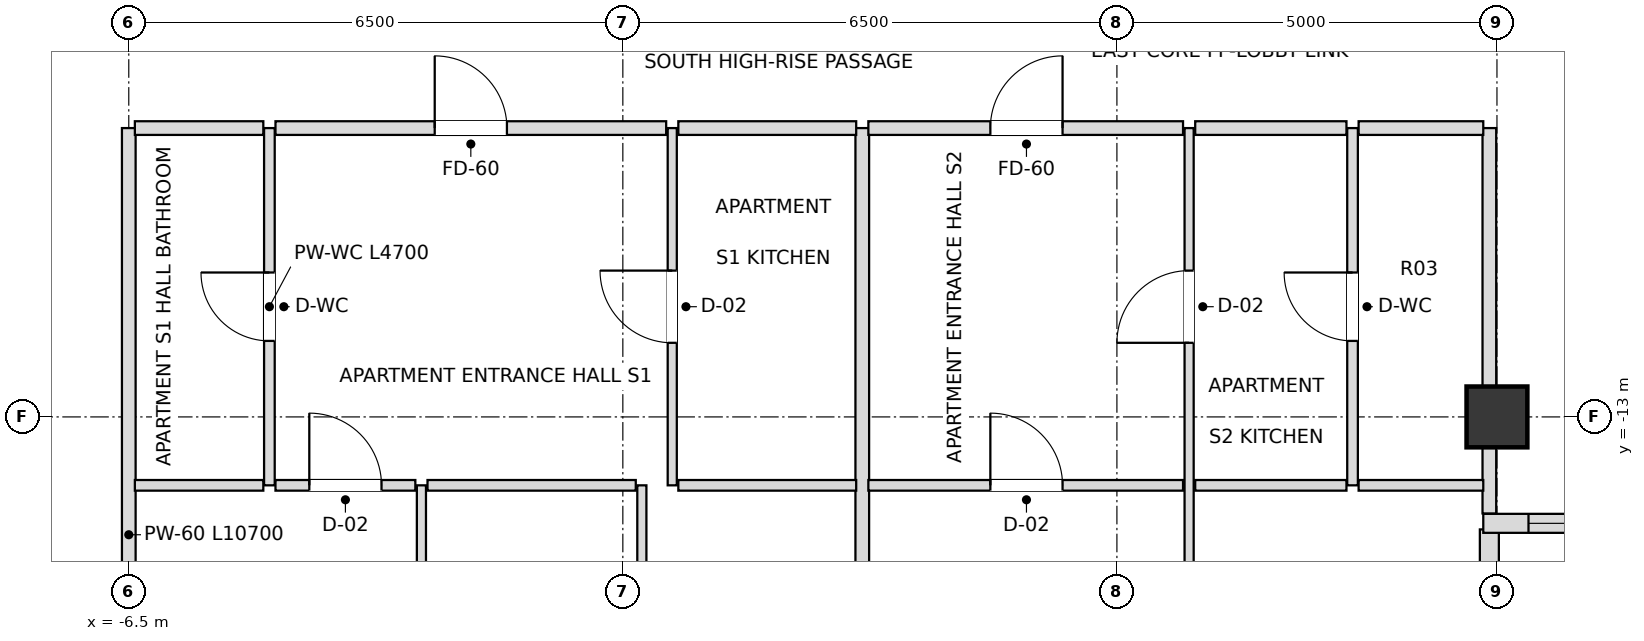
"""IFC4 building model, lengths in metres.
Left out: names, types, materials, properties, quantities, classifications, styles, units other than length and angle.
Written with IfcOpenShell. Run it as: python <this file> out.ifc"""

import sys

from ifc_helpers import new_model, si_unit, direction, frame, frame_2d, origin, origin_2d, place, context, subcontext, project, spatial, rectangle, extrude, element, fill, save


model = new_model("IFC4")
c1 = context("Model", 3, precision=1e-05, world=origin(), true_north=direction((0.0, 1.0)))
c2 = subcontext(c1, "Body", "Model", "MODEL_VIEW")
j1 = project(units=[si_unit("LENGTHUNIT", "METRE"), si_unit("PLANEANGLEUNIT", "RADIAN")], contexts=[c1])
p1 = place(None, origin())
s1 = spatial("IfcSite", under=j1, at=p1, CompositionType="ELEMENT")
p2 = place(p1, origin())
s2 = spatial("IfcBuilding", under=s1, at=p2, CompositionType="ELEMENT")
p3 = place(p2, frame((0.0, 0.0, 236.7)))
s3 = spatial("IfcBuildingStorey", under=s2, at=p3, CompositionType="ELEMENT", Elevation=236.7)
p4 = place(p3, frame((11.5, -13.0, 0.0), z_axis=(0.0, 0.0, 1.0), x_axis=(1.0, 0.0, 0.0)))
e1 = element("IfcColumn", 1, at=p4, inside=s3, PredefinedType="COLUMN", context=c2, shape_type="SweptSolid", body=[
    extrude(rectangle(XDim=0.8, YDim=0.8, at=origin_2d()), origin(), (0.0, 0.0, 1.0), 3.6),
])
p5 = place(p3, frame((11.4, -19.82, 0.0), z_axis=(0.0, 0.0, 1.0), x_axis=(0.0, 1.0, 0.0)))
e2 = element("IfcWall", 2, at=p5, inside=s3, PredefinedType="SOLIDWALL", context=c2, shape_type="SweptSolid", body=[
    extrude(rectangle(XDim=5.34, YDim=0.25, at=frame_2d((2.67, 0.0))), origin(), (0.0, 0.0, 1.0), 2.748),
])
p6 = place(p5, frame((1.925, 0.0, 0.72)))
e3 = element("IfcOpeningElement", 3, at=p6, cuts=e2, PredefinedType="OPENING", context=c2, shape_type="SweptSolid", body=[
    extrude(rectangle(XDim=1.8, YDim=1.68, at=frame_2d((0.9, 0.84))), frame((0.0, 0.135, 0.0), z_axis=(0.0, -1.0, 0.0), x_axis=(1.0, 0.0, 0.0)), (0.0, 0.0, 1.0), 0.27),
])
p7 = place(p3, frame((11.32, -14.4, 0.0), z_axis=(0.0, 0.0, 1.0), x_axis=(1.0, 0.0, 0.0)))
e4 = element("IfcWall", 4, at=p7, inside=s3, PredefinedType="SOLIDWALL", context=c2, shape_type="SweptSolid", body=[
    extrude(rectangle(XDim=5.66, YDim=0.25, at=frame_2d((2.83, 0.0))), origin(), (0.0, 0.0, 1.0), 2.748),
])
p8 = place(p7, frame((0.595, 0.0, 0.72)))
e5 = element("IfcOpeningElement", 5, at=p8, cuts=e4, PredefinedType="OPENING", context=c2, shape_type="SweptSolid", body=[
    extrude(rectangle(XDim=1.8, YDim=1.68, at=frame_2d((0.9, 0.84))), frame((0.0, 0.135, 0.0), z_axis=(0.0, -1.0, 0.0), x_axis=(1.0, 0.0, 0.0)), (0.0, 0.0, 1.0), 0.27),
])
p9 = place(p7, frame((3.265, 0.0, 0.72)))
e6 = element("IfcOpeningElement", 6, at=p9, cuts=e4, PredefinedType="OPENING", context=c2, shape_type="SweptSolid", body=[
    extrude(rectangle(XDim=1.8, YDim=1.68, at=frame_2d((0.9, 0.84))), frame((0.0, 0.135, 0.0), z_axis=(0.0, -1.0, 0.0), x_axis=(1.0, 0.0, 0.0)), (0.0, 0.0, 1.0), 0.27),
])
p10 = place(p3, frame((-6.5, -19.9, 0.0), z_axis=(0.0, 0.0, 1.0), x_axis=(0.0, 1.0, 0.0)))
e7 = element("IfcWall", 7, at=p10, inside=s3, PredefinedType="PARTITIONING", context=c2, shape_type="SweptSolid", body=[
    extrude(rectangle(XDim=10.7, YDim=0.18, at=frame_2d((5.35, 0.0))), origin(), (0.0, 0.0, 1.0), 2.826),
])
p11 = place(p3, frame((-4.65, -13.9, 0.0), z_axis=(0.0, 0.0, 1.0), x_axis=(0.0, 1.0, 0.0)))
e8 = element("IfcWall", 8, at=p11, inside=s3, PredefinedType="PARTITIONING", context=c2, shape_type="SweptSolid", body=[
    extrude(rectangle(XDim=4.7, YDim=0.14, at=frame_2d((2.35, 0.0))), origin(), (0.0, 0.0, 1.0), 3.38),
])
p12 = place(p11, frame((1.9, 0.0, 0.0)))
e9 = element("IfcOpeningElement", 9, at=p12, cuts=e8, PredefinedType="OPENING", context=c2, shape_type="SweptSolid", body=[
    extrude(rectangle(XDim=0.9, YDim=2.1, at=frame_2d((0.45, 1.05))), frame((0.0, 0.08, 0.0), z_axis=(0.0, -1.0, 0.0), x_axis=(1.0, 0.0, 0.0)), (0.0, 0.0, 1.0), 0.16),
])
p13 = place(p3, frame((-2.65, -19.9, 0.0), z_axis=(0.0, 0.0, 1.0), x_axis=(0.0, 1.0, 0.0)))
e10 = element("IfcWall", 10, at=p13, inside=s3, PredefinedType="PARTITIONING", context=c2, shape_type="SweptSolid", body=[
    extrude(rectangle(XDim=6.0, YDim=0.12, at=frame_2d((3.0, 0.0))), origin(), (0.0, 0.0, 1.0), 3.018),
])
p14 = place(p13, frame((2.55, 0.0, 0.0)))
e11 = element("IfcOpeningElement", 11, at=p14, cuts=e10, PredefinedType="OPENING", context=c2, shape_type="SweptSolid", body=[
    extrude(rectangle(XDim=0.9, YDim=2.1, at=frame_2d((0.45, 1.05))), frame((0.0, 0.07, 0.0), z_axis=(0.0, -1.0, 0.0), x_axis=(1.0, 0.0, 0.0)), (0.0, 0.0, 1.0), 0.14),
])
p15 = place(p3, frame((0.25, -19.9, 0.0), z_axis=(0.0, 0.0, 1.0), x_axis=(0.0, 1.0, 0.0)))
e12 = element("IfcWall", 12, at=p15, inside=s3, PredefinedType="PARTITIONING", context=c2, shape_type="SweptSolid", body=[
    extrude(rectangle(XDim=6.0, YDim=0.12, at=frame_2d((3.0, 0.0))), origin(), (0.0, 0.0, 1.0), 3.018),
])
p16 = place(p15, frame((2.55, 0.0, 0.0)))
e13 = element("IfcOpeningElement", 13, at=p16, cuts=e12, PredefinedType="OPENING", context=c2, shape_type="SweptSolid", body=[
    extrude(rectangle(XDim=0.9, YDim=2.1, at=frame_2d((0.45, 1.05))), frame((0.0, 0.07, 0.0), z_axis=(0.0, -1.0, 0.0), x_axis=(1.0, 0.0, 0.0)), (0.0, 0.0, 1.0), 0.14),
])
p17 = place(p3, frame((0.65, -13.9, 0.0), z_axis=(0.0, 0.0, 1.0), x_axis=(0.0, 1.0, 0.0)))
e14 = element("IfcWall", 14, at=p17, inside=s3, PredefinedType="PARTITIONING", context=c2, shape_type="SweptSolid", body=[
    extrude(rectangle(XDim=4.7, YDim=0.12, at=frame_2d((2.35, 0.0))), origin(), (0.0, 0.0, 1.0), 3.38),
])
p18 = place(p17, frame((1.875, 0.0, 0.0)))
e15 = element("IfcOpeningElement", 15, at=p18, cuts=e14, PredefinedType="OPENING", context=c2, shape_type="SweptSolid", body=[
    extrude(rectangle(XDim=0.95, YDim=2.1, at=frame_2d((0.475, 1.05))), frame((0.0, 0.07, 0.0), z_axis=(0.0, -1.0, 0.0), x_axis=(1.0, 0.0, 0.0)), (0.0, 0.0, 1.0), 0.14),
])
p19 = place(p3, frame((3.15, -19.9, 0.0), z_axis=(0.0, 0.0, 1.0), x_axis=(0.0, 1.0, 0.0)))
e16 = element("IfcWall", 16, at=p19, inside=s3, PredefinedType="PARTITIONING", context=c2, shape_type="SweptSolid", body=[
    extrude(rectangle(XDim=10.7, YDim=0.18, at=frame_2d((5.35, 0.0))), origin(), (0.0, 0.0, 1.0), 3.018),
])
p20 = place(p3, frame((7.45, -19.9, 0.0), z_axis=(0.0, 0.0, 1.0), x_axis=(0.0, 1.0, 0.0)))
e17 = element("IfcWall", 17, at=p20, inside=s3, PredefinedType="PARTITIONING", context=c2, shape_type="SweptSolid", body=[
    extrude(rectangle(XDim=10.7, YDim=0.12, at=frame_2d((5.35, 0.0))), origin(), (0.0, 0.0, 1.0), 2.826),
])
p21 = place(p20, frame((7.875, 0.0, 0.0)))
e18 = element("IfcOpeningElement", 18, at=p21, cuts=e17, PredefinedType="OPENING", context=c2, shape_type="SweptSolid", body=[
    extrude(rectangle(XDim=0.95, YDim=2.1, at=frame_2d((0.475, 1.05))), frame((0.0, 0.07, 0.0), z_axis=(0.0, -1.0, 0.0), x_axis=(1.0, 0.0, 0.0)), (0.0, 0.0, 1.0), 0.14),
])
p22 = place(p20, frame((2.55, 0.0, 0.0)))
e19 = element("IfcOpeningElement", 19, at=p22, cuts=e17, PredefinedType="OPENING", context=c2, shape_type="SweptSolid", body=[
    extrude(rectangle(XDim=0.9, YDim=2.1, at=frame_2d((0.45, 1.05))), frame((0.0, 0.07, 0.0), z_axis=(0.0, -1.0, 0.0), x_axis=(1.0, 0.0, 0.0)), (0.0, 0.0, 1.0), 0.14),
])
p23 = place(p3, frame((9.6, -13.9, 0.0), z_axis=(0.0, 0.0, 1.0), x_axis=(0.0, 1.0, 0.0)))
e20 = element("IfcWall", 20, at=p23, inside=s3, PredefinedType="PARTITIONING", context=c2, shape_type="SweptSolid", body=[
    extrude(rectangle(XDim=4.7, YDim=0.14, at=frame_2d((2.35, 0.0))), origin(), (0.0, 0.0, 1.0), 2.826),
])
p24 = place(p23, frame((1.9, 0.0, 0.0)))
e21 = element("IfcOpeningElement", 21, at=p24, cuts=e20, PredefinedType="OPENING", context=c2, shape_type="SweptSolid", body=[
    extrude(rectangle(XDim=0.9, YDim=2.1, at=frame_2d((0.45, 1.05))), frame((0.0, 0.08, 0.0), z_axis=(0.0, -1.0, 0.0), x_axis=(1.0, 0.0, 0.0)), (0.0, 0.0, 1.0), 0.16),
])
p25 = place(p3, frame((11.4, -14.27, 0.0), z_axis=(0.0, 0.0, 1.0), x_axis=(0.0, 1.0, 0.0)))
e22 = element("IfcWall", 22, at=p25, inside=s3, PredefinedType="PARTITIONING", context=c2, shape_type="SweptSolid", body=[
    extrude(rectangle(XDim=5.07, YDim=0.18, at=frame_2d((2.535, 0.0))), origin(), (0.0, 0.0, 1.0), 2.748),
])
p26 = place(p3, frame((-6.42, -13.9, 0.0), z_axis=(0.0, 0.0, 1.0), x_axis=(1.0, 0.0, 0.0)))
e23 = element("IfcWall", 23, at=p26, inside=s3, PredefinedType="PARTITIONING", context=c2, shape_type="SweptSolid", body=[
    extrude(rectangle(XDim=1.69, YDim=0.14, at=frame_2d((0.845, 0.0))), origin(), (0.0, 0.0, 1.0), 3.38),
])
p27 = place(p3, frame((-4.57, -13.9, 0.0), z_axis=(0.0, 0.0, 1.0), x_axis=(1.0, 0.0, 0.0)))
e24 = element("IfcWall", 24, at=p27, inside=s3, PredefinedType="PARTITIONING", context=c2, shape_type="SweptSolid", body=[
    extrude(rectangle(XDim=1.84, YDim=0.14, at=frame_2d((0.92, 0.0))), origin(), (0.0, 0.0, 1.0), 3.38),
])
p28 = place(p27, frame((0.445, 0.0, 0.0)))
e25 = element("IfcOpeningElement", 25, at=p28, cuts=e24, PredefinedType="OPENING", context=c2, shape_type="SweptSolid", body=[
    extrude(rectangle(XDim=0.95, YDim=2.1, at=frame_2d((0.475, 1.05))), frame((0.0, 0.08, 0.0), z_axis=(0.0, -1.0, 0.0), x_axis=(1.0, 0.0, 0.0)), (0.0, 0.0, 1.0), 0.16),
])
p29 = place(p3, frame((-2.57, -13.9, 0.0), z_axis=(0.0, 0.0, 1.0), x_axis=(1.0, 0.0, 0.0)))
e26 = element("IfcWall", 26, at=p29, inside=s3, PredefinedType="PARTITIONING", context=c2, shape_type="SweptSolid", body=[
    extrude(rectangle(XDim=2.74, YDim=0.14, at=frame_2d((1.37, 0.0))), origin(), (0.0, 0.0, 1.0), 3.38),
])
p30 = place(p3, frame((0.73, -13.9, 0.0), z_axis=(0.0, 0.0, 1.0), x_axis=(1.0, 0.0, 0.0)))
e27 = element("IfcWall", 27, at=p30, inside=s3, PredefinedType="PARTITIONING", context=c2, shape_type="SweptSolid", body=[
    extrude(rectangle(XDim=2.34, YDim=0.14, at=frame_2d((1.17, 0.0))), origin(), (0.0, 0.0, 1.0), 3.38),
])
p31 = place(p3, frame((3.23, -13.9, 0.0), z_axis=(0.0, 0.0, 1.0), x_axis=(1.0, 0.0, 0.0)))
e28 = element("IfcWall", 28, at=p31, inside=s3, PredefinedType="PARTITIONING", context=c2, shape_type="SweptSolid", body=[
    extrude(rectangle(XDim=4.14, YDim=0.14, at=frame_2d((2.07, 0.0))), origin(), (0.0, 0.0, 1.0), 2.826),
])
p32 = place(p31, frame((1.605, 0.0, 0.0)))
e29 = element("IfcOpeningElement", 29, at=p32, cuts=e28, PredefinedType="OPENING", context=c2, shape_type="SweptSolid", body=[
    extrude(rectangle(XDim=0.95, YDim=2.1, at=frame_2d((0.475, 1.05))), frame((0.0, 0.08, 0.0), z_axis=(0.0, -1.0, 0.0), x_axis=(1.0, 0.0, 0.0)), (0.0, 0.0, 1.0), 0.16),
])
p33 = place(p3, frame((7.53, -13.9, 0.0), z_axis=(0.0, 0.0, 1.0), x_axis=(1.0, 0.0, 0.0)))
e30 = element("IfcWall", 30, at=p33, inside=s3, PredefinedType="PARTITIONING", context=c2, shape_type="SweptSolid", body=[
    extrude(rectangle(XDim=1.99, YDim=0.14, at=frame_2d((0.995, 0.0))), origin(), (0.0, 0.0, 1.0), 3.38),
])
p34 = place(p3, frame((9.68, -13.9, 0.0), z_axis=(0.0, 0.0, 1.0), x_axis=(1.0, 0.0, 0.0)))
e31 = element("IfcWall", 31, at=p34, inside=s3, PredefinedType="PARTITIONING", context=c2, shape_type="SweptSolid", body=[
    extrude(rectangle(XDim=1.64, YDim=0.14, at=frame_2d((0.82, 0.0))), origin(), (0.0, 0.0, 1.0), 3.38),
])
p35 = place(p3, frame((-6.42, -9.2, 0.0), z_axis=(0.0, 0.0, 1.0), x_axis=(1.0, 0.0, 0.0)))
e32 = element("IfcWall", 32, at=p35, inside=s3, PredefinedType="PARTITIONING", context=c2, shape_type="SweptSolid", body=[
    extrude(rectangle(XDim=1.69, YDim=0.18, at=frame_2d((0.845, 0.0))), origin(), (0.0, 0.0, 1.0), 3.38),
])
p36 = place(p3, frame((-4.57, -9.2, 0.0), z_axis=(0.0, 0.0, 1.0), x_axis=(1.0, 0.0, 0.0)))
e33 = element("IfcWall", 33, at=p36, inside=s3, PredefinedType="PARTITIONING", context=c2, shape_type="SweptSolid", body=[
    extrude(rectangle(XDim=5.14, YDim=0.18, at=frame_2d((2.57, 0.0))), origin(), (0.0, 0.0, 1.0), 3.38),
])
p37 = place(p36, frame((2.095, 0.0, 0.0)))
e34 = element("IfcOpeningElement", 34, at=p37, cuts=e33, PredefinedType="OPENING", context=c2, shape_type="SweptSolid", body=[
    extrude(rectangle(XDim=0.95, YDim=2.15, at=frame_2d((0.475, 1.075))), frame((0.0, 0.1, 0.0), z_axis=(0.0, -1.0, 0.0), x_axis=(1.0, 0.0, 0.0)), (0.0, 0.0, 1.0), 0.2),
])
p38 = place(p3, frame((0.73, -9.2, 0.0), z_axis=(0.0, 0.0, 1.0), x_axis=(1.0, 0.0, 0.0)))
e35 = element("IfcWall", 35, at=p38, inside=s3, PredefinedType="PARTITIONING", context=c2, shape_type="SweptSolid", body=[
    extrude(rectangle(XDim=2.34, YDim=0.18, at=frame_2d((1.17, 0.0))), origin(), (0.0, 0.0, 1.0), 3.38),
])
p39 = place(p3, frame((3.23, -9.2, 0.0), z_axis=(0.0, 0.0, 1.0), x_axis=(1.0, 0.0, 0.0)))
e36 = element("IfcWall", 36, at=p39, inside=s3, PredefinedType="PARTITIONING", context=c2, shape_type="SweptSolid", body=[
    extrude(rectangle(XDim=4.14, YDim=0.18, at=frame_2d((2.07, 0.0))), origin(), (0.0, 0.0, 1.0), 2.826),
])
p40 = place(p39, frame((1.605, 0.0, 0.0)))
e37 = element("IfcOpeningElement", 37, at=p40, cuts=e36, PredefinedType="OPENING", context=c2, shape_type="SweptSolid", body=[
    extrude(rectangle(XDim=0.95, YDim=2.15, at=frame_2d((0.475, 1.075))), frame((0.0, 0.1, 0.0), z_axis=(0.0, -1.0, 0.0), x_axis=(1.0, 0.0, 0.0)), (0.0, 0.0, 1.0), 0.2),
])
p41 = place(p3, frame((7.53, -9.2, 0.0), z_axis=(0.0, 0.0, 1.0), x_axis=(1.0, 0.0, 0.0)))
e38 = element("IfcWall", 38, at=p41, inside=s3, PredefinedType="PARTITIONING", context=c2, shape_type="SweptSolid", body=[
    extrude(rectangle(XDim=1.99, YDim=0.18, at=frame_2d((0.995, 0.0))), origin(), (0.0, 0.0, 1.0), 3.38),
])
p42 = place(p3, frame((9.68, -9.2, 0.0), z_axis=(0.0, 0.0, 1.0), x_axis=(1.0, 0.0, 0.0)))
e39 = element("IfcWall", 39, at=p42, inside=s3, PredefinedType="PARTITIONING", context=c2, shape_type="SweptSolid", body=[
    extrude(rectangle(XDim=1.64, YDim=0.18, at=frame_2d((0.82, 0.0))), origin(), (0.0, 0.0, 1.0), 3.38),
])
p43 = place(p8, origin())
e40 = element("IfcWindow", 40, at=p43, inside=s3, PartitioningType="SINGLE_PANEL", PredefinedType="WINDOW", context=c2, shape_type="SweptSolid", body=[
    extrude(rectangle(XDim=1.8, YDim=1.68, at=frame_2d((0.9, 0.84))), frame((0.0, 0.03, 0.0), z_axis=(0.0, -1.0, 0.0), x_axis=(1.0, 0.0, 0.0)), (0.0, 0.0, 1.0), 0.06),
])
fill(e5, e40)
p44 = place(p12, origin())
e41 = element("IfcDoor", 41, at=p44, inside=s3, OperationType="SINGLE_SWING_RIGHT", PredefinedType="DOOR", context=c2, shape_type="SweptSolid", body=[
    extrude(rectangle(XDim=0.9, YDim=2.1, at=frame_2d((0.45, 1.05))), frame((0.0, 0.025, 0.0), z_axis=(0.0, -1.0, 0.0), x_axis=(1.0, 0.0, 0.0)), (0.0, 0.0, 1.0), 0.05),
])
fill(e9, e41)
p45 = place(p37, origin())
e42 = element("IfcDoor", 42, at=p45, inside=s3, OperationType="SINGLE_SWING_LEFT", PredefinedType="DOOR", context=c2, shape_type="SweptSolid", body=[
    extrude(rectangle(XDim=0.95, YDim=2.15, at=frame_2d((0.475, 1.075))), frame((0.0, 0.025, 0.0), z_axis=(0.0, -1.0, 0.0), x_axis=(1.0, 0.0, 0.0)), (0.0, 0.0, 1.0), 0.05),
])
fill(e34, e42)
p46 = place(p18, origin())
e43 = element("IfcDoor", 43, at=p46, inside=s3, OperationType="SINGLE_SWING_RIGHT", PredefinedType="DOOR", context=c2, shape_type="SweptSolid", body=[
    extrude(rectangle(XDim=0.95, YDim=2.1, at=frame_2d((0.475, 1.05))), frame((0.0, 0.025, 0.0), z_axis=(0.0, -1.0, 0.0), x_axis=(1.0, 0.0, 0.0)), (0.0, 0.0, 1.0), 0.05),
])
fill(e15, e43)
p47 = place(p28, origin())
e44 = element("IfcDoor", 44, at=p47, inside=s3, OperationType="SINGLE_SWING_LEFT", PredefinedType="DOOR", context=c2, shape_type="SweptSolid", body=[
    extrude(rectangle(XDim=0.95, YDim=2.1, at=frame_2d((0.475, 1.05))), frame((0.0, 0.025, 0.0), z_axis=(0.0, -1.0, 0.0), x_axis=(1.0, 0.0, 0.0)), (0.0, 0.0, 1.0), 0.05),
])
fill(e25, e44)
p48 = place(p40, origin())
e45 = element("IfcDoor", 45, at=p48, inside=s3, OperationType="SINGLE_SWING_RIGHT", PredefinedType="DOOR", context=c2, shape_type="SweptSolid", body=[
    extrude(rectangle(XDim=0.95, YDim=2.15, at=frame_2d((0.475, 1.075))), frame((0.0, 0.025, 0.0), z_axis=(0.0, -1.0, 0.0), x_axis=(1.0, 0.0, 0.0)), (0.0, 0.0, 1.0), 0.05),
])
fill(e37, e45)
p49 = place(p21, origin())
e46 = element("IfcDoor", 46, at=p49, inside=s3, OperationType="SINGLE_SWING_LEFT", PredefinedType="DOOR", context=c2, shape_type="SweptSolid", body=[
    extrude(rectangle(XDim=0.95, YDim=2.1, at=frame_2d((0.475, 1.05))), frame((0.0, 0.025, 0.0), z_axis=(0.0, -1.0, 0.0), x_axis=(1.0, 0.0, 0.0)), (0.0, 0.0, 1.0), 0.05),
])
fill(e18, e46)
p50 = place(p24, origin())
e47 = element("IfcDoor", 47, at=p50, inside=s3, OperationType="SINGLE_SWING_RIGHT", PredefinedType="DOOR", context=c2, shape_type="SweptSolid", body=[
    extrude(rectangle(XDim=0.9, YDim=2.1, at=frame_2d((0.45, 1.05))), frame((0.0, 0.025, 0.0), z_axis=(0.0, -1.0, 0.0), x_axis=(1.0, 0.0, 0.0)), (0.0, 0.0, 1.0), 0.05),
])
fill(e21, e47)
p51 = place(p32, origin())
e48 = element("IfcDoor", 48, at=p51, inside=s3, OperationType="SINGLE_SWING_LEFT", PredefinedType="DOOR", context=c2, shape_type="SweptSolid", body=[
    extrude(rectangle(XDim=0.95, YDim=2.1, at=frame_2d((0.475, 1.05))), frame((0.0, 0.025, 0.0), z_axis=(0.0, -1.0, 0.0), x_axis=(1.0, 0.0, 0.0)), (0.0, 0.0, 1.0), 0.05),
])
fill(e29, e48)
save(model, sys.argv[1])
